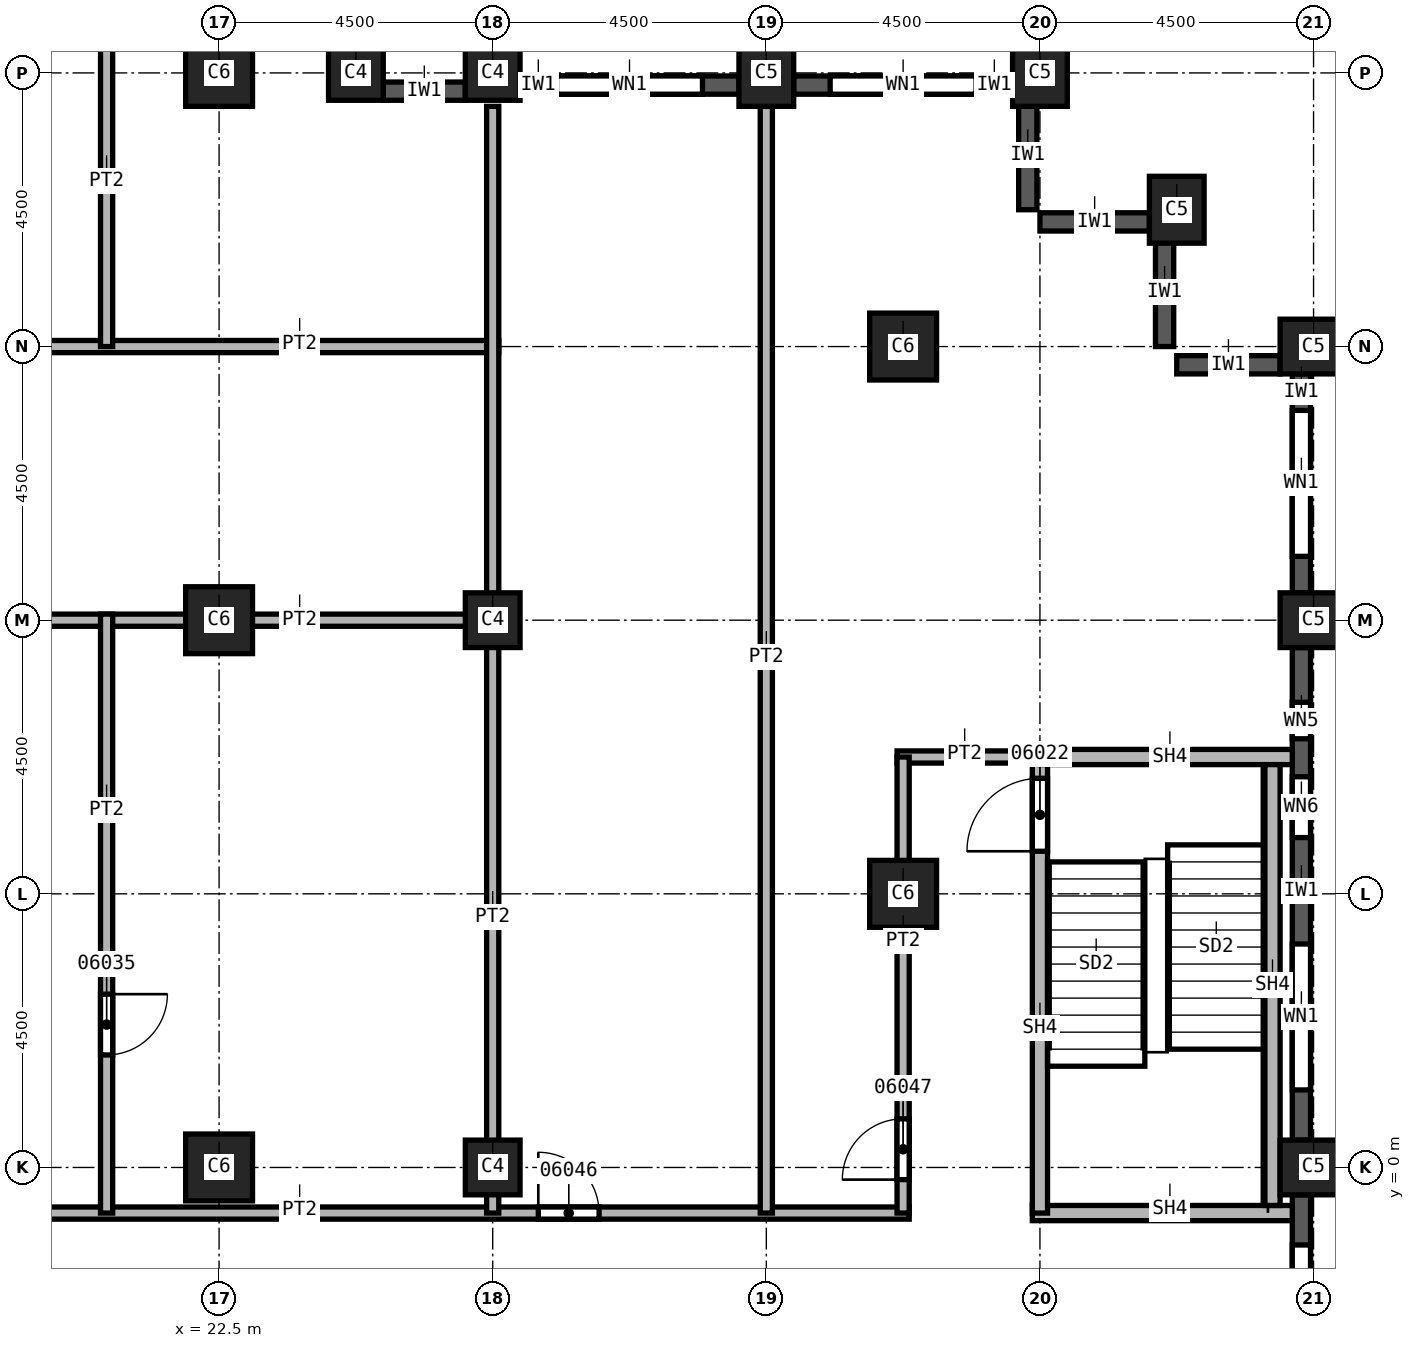
"""IFC4 building model, lengths in metres.
Left out: names, types, materials, properties, quantities, classifications, styles, units other than length and angle.
Written with IfcOpenShell. Run it as: python <this file> out.ifc"""

import sys

from ifc_helpers import new_model, si_unit, direction, frame, frame_2d, origin, origin_2d, place, context, subcontext, project, spatial, rectangle, extrude, element, fill, save


model = new_model("IFC4")
c1 = context("Model", 3, precision=1e-05, world=origin(), true_north=direction((0.0, 1.0)))
c2 = subcontext(c1, "Body", "Model", "MODEL_VIEW")
j1 = project(units=[si_unit("LENGTHUNIT", "METRE"), si_unit("PLANEANGLEUNIT", "RADIAN")], contexts=[c1])
p1 = place(None, origin())
s1 = spatial("IfcSite", under=j1, at=p1, CompositionType="ELEMENT")
p2 = place(p1, origin())
s2 = spatial("IfcBuilding", under=s1, at=p2, CompositionType="ELEMENT")
p3 = place(p2, frame((0.0, 0.0, 130.0)))
s3 = spatial("IfcBuildingStorey", under=s2, at=p3, CompositionType="ELEMENT", Elevation=130.0)
for number, where, z_axis, x_axis in (
    (1, (40.5, 0.0, 0.0), (0.0, 0.0, 1.0), (0.0, 1.0, 0.0)),
    (2, (40.5, 9.0, 0.0), (0.0, 0.0, 1.0), (0.0, 1.0, 0.0)),
    (3, (40.5, 13.5, 0.0), (0.0, 0.0, 1.0), (0.0, 1.0, 0.0)),
    (4, (38.25, 15.75, 0.0), (0.0, 0.0, 1.0), (1.0, 0.0, 0.0)),
    (5, (31.5, 18.0, 0.0), (0.0, 0.0, 1.0), (1.0, 0.0, 0.0)),
    (6, (36.0, 18.0, 0.0), (0.0, 0.0, 1.0), (1.0, 0.0, 0.0)),
):
    element("IfcColumn", number, at=place(p3, frame(where, z_axis=z_axis, x_axis=x_axis)), inside=s3, PredefinedType="COLUMN", context=c2, shape_type="SweptSolid", body=[
        extrude(rectangle(XDim=0.9, YDim=1.1, at=origin_2d()), origin(), (0.0, 0.0, 1.0), 3.7),
    ])
for number, where, z_axis, x_axis in (
    (7, (33.75, 4.5, 0.0), (0.0, 0.0, 1.0), (1.0, 0.0, 0.0)),
    (8, (33.75, 13.5, 0.0), (0.0, 0.0, 1.0), (1.0, 0.0, 0.0)),
    (9, (22.5, 0.0, 0.0), (0.0, 0.0, 1.0), (1.0, 0.0, 0.0)),
    (10, (22.5, 9.0, 0.0), (0.0, 0.0, 1.0), (1.0, 0.0, 0.0)),
    (11, (22.5, 18.0, 0.0), (0.0, 0.0, 1.0), (1.0, 0.0, 0.0)),
):
    element("IfcColumn", number, at=place(p3, frame(where, z_axis=z_axis, x_axis=x_axis)), inside=s3, PredefinedType="COLUMN", context=c2, shape_type="SweptSolid", body=[
        extrude(rectangle(XDim=1.1, YDim=1.1, at=origin_2d()), origin(), (0.0, 0.0, 1.0), 3.7),
    ])
for number, where, z_axis, x_axis in (
    (12, (27.0, 0.0, 0.0), (0.0, 0.0, 1.0), (1.0, 0.0, 0.0)),
    (13, (27.0, 9.0, 0.0), (0.0, 0.0, 1.0), (1.0, 0.0, 0.0)),
    (14, (27.0, 18.0, 0.0), (0.0, 0.0, 1.0), (1.0, 0.0, 0.0)),
    (15, (24.75, 18.0, 0.0), (0.0, 0.0, 1.0), (1.0, 0.0, 0.0)),
):
    element("IfcColumn", number, at=place(p3, frame(where, z_axis=z_axis, x_axis=x_axis)), inside=s3, PredefinedType="COLUMN", context=c2, shape_type="SweptSolid", body=[
        extrude(rectangle(XDim=0.9, YDim=0.9, at=origin_2d()), origin(), (0.0, 0.0, 1.0), 3.7),
    ])
p4 = place(p3, frame((39.95, 13.2, 0.0), z_axis=(0.0, 0.0, 1.0), x_axis=(-1.0, 0.0, 0.0)))
e16 = element("IfcWall", 16, at=p4, inside=s3, PredefinedType="SOLIDWALL", context=c2, shape_type="SweptSolid", body=[
    extrude(rectangle(XDim=1.7, YDim=0.3, at=frame_2d((0.85, 0.0))), origin(), (0.0, 0.0, 1.0), 3.1),
])
for number, where, z_axis, x_axis in (
    (17, (38.05, 15.3, 0.0), (0.0, 0.0, 1.0), (0.0, -1.0, 0.0)),
    (18, (37.8, 15.55, 0.0), (0.0, 0.0, 1.0), (-1.0, 0.0, 0.0)),
    (19, (35.8, 17.55, 0.0), (0.0, 0.0, 1.0), (0.0, -1.0, 0.0)),
):
    element("IfcWall", number, at=place(p3, frame(where, z_axis=z_axis, x_axis=x_axis)), inside=s3, PredefinedType="SOLIDWALL", context=c2, shape_type="SweptSolid", body=[
        extrude(rectangle(XDim=1.8, YDim=0.3, at=frame_2d((0.9, 0.0))), origin(), (0.0, 0.0, 1.0), 3.1),
    ])
p5 = place(p3, frame((40.3, -8.55, 0.0), z_axis=(0.0, 0.0, 1.0), x_axis=(0.0, 1.0, 0.0)))
e20 = element("IfcWall", 20, at=p5, inside=s3, PredefinedType="SOLIDWALL", context=c2, shape_type="SweptSolid", body=[
    extrude(rectangle(XDim=8.1, YDim=0.3, at=frame_2d((4.05, 0.0))), origin(), (0.0, 0.0, 1.0), 3.1),
])
p6 = place(p5, frame((0.825, 0.0, 0.8)))
e21 = element("IfcOpeningElement", 21, at=p6, cuts=e20, PredefinedType="OPENING", context=c2, shape_type="SweptSolid", body=[
    extrude(rectangle(XDim=2.4, YDim=1.95, at=frame_2d((1.2, 0.975))), frame((0.0, 0.15, 0.0), z_axis=(0.0, -1.0, 0.0), x_axis=(1.0, 0.0, 0.0)), (0.0, 0.0, 1.0), 0.3),
])
p7 = place(p5, frame((4.875, 0.0, 0.8)))
e22 = element("IfcOpeningElement", 22, at=p7, cuts=e20, PredefinedType="OPENING", context=c2, shape_type="SweptSolid", body=[
    extrude(rectangle(XDim=2.4, YDim=1.95, at=frame_2d((1.2, 0.975))), frame((0.0, 0.15, 0.0), z_axis=(0.0, -1.0, 0.0), x_axis=(1.0, 0.0, 0.0)), (0.0, 0.0, 1.0), 0.3),
])
p8 = place(p3, frame((40.3, 0.45, 0.0), z_axis=(0.0, 0.0, 1.0), x_axis=(0.0, 1.0, 0.0)))
e23 = element("IfcWall", 23, at=p8, inside=s3, PredefinedType="SOLIDWALL", context=c2, shape_type="SweptSolid", body=[
    extrude(rectangle(XDim=8.1, YDim=0.3, at=frame_2d((4.05, 0.0))), origin(), (0.0, 0.0, 1.0), 3.1),
])
p9 = place(p8, frame((0.825, 0.0, 0.8)))
e24 = element("IfcOpeningElement", 24, at=p9, cuts=e23, PredefinedType="OPENING", context=c2, shape_type="SweptSolid", body=[
    extrude(rectangle(XDim=2.4, YDim=1.95, at=frame_2d((1.2, 0.975))), frame((0.0, 0.15, 0.0), z_axis=(0.0, -1.0, 0.0), x_axis=(1.0, 0.0, 0.0)), (0.0, 0.0, 1.0), 0.3),
])
p10 = place(p8, frame((4.975, 0.0, 0.8)))
e25 = element("IfcOpeningElement", 25, at=p10, cuts=e23, PredefinedType="OPENING", context=c2, shape_type="SweptSolid", body=[
    extrude(rectangle(XDim=1.0, YDim=1.95, at=frame_2d((0.5, 0.975))), frame((0.0, 0.15, 0.0), z_axis=(0.0, -1.0, 0.0), x_axis=(1.0, 0.0, 0.0)), (0.0, 0.0, 1.0), 0.3),
])
p11 = place(p8, frame((6.6, 0.0, 0.8)))
e26 = element("IfcOpeningElement", 26, at=p11, cuts=e23, PredefinedType="OPENING", context=c2, shape_type="SweptSolid", body=[
    extrude(rectangle(XDim=0.6, YDim=1.95, at=frame_2d((0.3, 0.975))), frame((0.0, 0.15, 0.0), z_axis=(0.0, -1.0, 0.0), x_axis=(1.0, 0.0, 0.0)), (0.0, 0.0, 1.0), 0.3),
])
p12 = place(p3, frame((40.3, 9.45, 0.0), z_axis=(0.0, 0.0, 1.0), x_axis=(0.0, 1.0, 0.0)))
e27 = element("IfcWall", 27, at=p12, inside=s3, PredefinedType="SOLIDWALL", context=c2, shape_type="SweptSolid", body=[
    extrude(rectangle(XDim=3.6, YDim=0.3, at=frame_2d((1.8, 0.0))), origin(), (0.0, 0.0, 1.0), 3.1),
])
p13 = place(p12, frame((0.6, 0.0, 0.8)))
e28 = element("IfcOpeningElement", 28, at=p13, cuts=e27, PredefinedType="OPENING", context=c2, shape_type="SweptSolid", body=[
    extrude(rectangle(XDim=2.4, YDim=1.95, at=frame_2d((1.2, 0.975))), frame((0.0, 0.15, 0.0), z_axis=(0.0, -1.0, 0.0), x_axis=(1.0, 0.0, 0.0)), (0.0, 0.0, 1.0), 0.3),
])
p14 = place(p3, frame((35.55, 17.8, 0.0), z_axis=(0.0, 0.0, 1.0), x_axis=(-1.0, 0.0, 0.0)))
e29 = element("IfcWall", 29, at=p14, inside=s3, PredefinedType="SOLIDWALL", context=c2, shape_type="SweptSolid", body=[
    extrude(rectangle(XDim=3.6, YDim=0.3, at=frame_2d((1.8, 0.0))), origin(), (0.0, 0.0, 1.0), 3.1),
])
p15 = place(p14, frame((0.6, 0.0, 0.8)))
e30 = element("IfcOpeningElement", 30, at=p15, cuts=e29, PredefinedType="OPENING", context=c2, shape_type="SweptSolid", body=[
    extrude(rectangle(XDim=2.4, YDim=1.95, at=frame_2d((1.2, 0.975))), frame((0.0, 0.15, 0.0), z_axis=(0.0, -1.0, 0.0), x_axis=(1.0, 0.0, 0.0)), (0.0, 0.0, 1.0), 0.3),
])
p16 = place(p3, frame((31.05, 17.8, 0.0), z_axis=(0.0, 0.0, 1.0), x_axis=(-1.0, 0.0, 0.0)))
e31 = element("IfcWall", 31, at=p16, inside=s3, PredefinedType="SOLIDWALL", context=c2, shape_type="SweptSolid", body=[
    extrude(rectangle(XDim=3.6, YDim=0.3, at=frame_2d((1.8, 0.0))), origin(), (0.0, 0.0, 1.0), 3.1),
])
p17 = place(p16, frame((0.6, 0.0, 0.8)))
e32 = element("IfcOpeningElement", 32, at=p17, cuts=e31, PredefinedType="OPENING", context=c2, shape_type="SweptSolid", body=[
    extrude(rectangle(XDim=2.4, YDim=1.95, at=frame_2d((1.2, 0.975))), frame((0.0, 0.15, 0.0), z_axis=(0.0, -1.0, 0.0), x_axis=(1.0, 0.0, 0.0)), (0.0, 0.0, 1.0), 0.3),
])
p18 = place(p3, frame((26.55, 17.7, 0.0), z_axis=(0.0, 0.0, 1.0), x_axis=(-1.0, 0.0, 0.0)))
e33 = element("IfcWall", 33, at=p18, inside=s3, PredefinedType="SOLIDWALL", context=c2, shape_type="SweptSolid", body=[
    extrude(rectangle(XDim=1.35, YDim=0.3, at=frame_2d((0.675, 0.0))), origin(), (0.0, 0.0, 1.0), 3.1),
])
p19 = place(p3, frame((15.4, -0.75, 0.0), z_axis=(0.0, 0.0, 1.0), x_axis=(1.0, 0.0, 0.0)))
e34 = element("IfcWall", 34, at=p19, inside=s3, PredefinedType="PARTITIONING", context=c2, shape_type="SweptSolid", body=[
    extrude(rectangle(XDim=18.45, YDim=0.2, at=frame_2d((9.225, 0.0))), origin(), (0.0, 0.0, 1.0), 3.7),
])
p20 = place(p19, frame((12.35, 0.0, 0.0)))
e35 = element("IfcOpeningElement", 35, at=p20, cuts=e34, PredefinedType="OPENING", context=c2, shape_type="SweptSolid", body=[
    extrude(rectangle(XDim=1.0, YDim=2.1, at=frame_2d((0.5, 1.05))), frame((0.0, 0.1, 0.0), z_axis=(0.0, -1.0, 0.0), x_axis=(1.0, 0.0, 0.0)), (0.0, 0.0, 1.0), 0.2),
])
for number, where, z_axis, x_axis in (
    (36, (15.4, 9.0, 0.0), (0.0, 0.0, 1.0), (1.0, 0.0, 0.0)),
    (37, (15.4, 13.5, 0.0), (0.0, 0.0, 1.0), (1.0, 0.0, 0.0)),
):
    element("IfcWall", number, at=place(p3, frame(where, z_axis=z_axis, x_axis=x_axis)), inside=s3, PredefinedType="PARTITIONING", context=c2, shape_type="SweptSolid", body=[
        extrude(rectangle(XDim=11.7, YDim=0.2, at=frame_2d((5.85, 0.0))), origin(), (0.0, 0.0, 1.0), 3.7),
    ])
p21 = place(p3, frame((20.65, 9.1, 0.0), z_axis=(0.0, 0.0, 1.0), x_axis=(0.0, -1.0, 0.0)))
e38 = element("IfcWall", 38, at=p21, inside=s3, PredefinedType="PARTITIONING", context=c2, shape_type="SweptSolid", body=[
    extrude(rectangle(XDim=9.85, YDim=0.2, at=frame_2d((4.925, 0.0))), origin(), (0.0, 0.0, 1.0), 3.7),
])
p22 = place(p21, frame((6.25, 0.0, 0.0)))
e39 = element("IfcOpeningElement", 39, at=p22, cuts=e38, PredefinedType="OPENING", context=c2, shape_type="SweptSolid", body=[
    extrude(rectangle(XDim=1.0, YDim=2.1, at=frame_2d((0.5, 1.05))), frame((0.0, 0.1, 0.0), z_axis=(0.0, -1.0, 0.0), x_axis=(1.0, 0.0, 0.0)), (0.0, 0.0, 1.0), 0.2),
])
p23 = place(p3, frame((20.65, 23.25, 0.0), z_axis=(0.0, 0.0, 1.0), x_axis=(0.0, -1.0, 0.0)))
e40 = element("IfcWall", 40, at=p23, inside=s3, PredefinedType="PARTITIONING", context=c2, shape_type="SweptSolid", body=[
    extrude(rectangle(XDim=9.75, YDim=0.2, at=frame_2d((4.875, 0.0))), origin(), (0.0, 0.0, 1.0), 3.7),
])
p24 = place(p23, frame((3.4, 0.0, 0.0)))
e41 = element("IfcOpeningElement", 41, at=p24, cuts=e40, PredefinedType="OPENING", context=c2, shape_type="SweptSolid", body=[
    extrude(rectangle(XDim=1.0, YDim=2.1, at=frame_2d((0.5, 1.05))), frame((0.0, 0.1, 0.0), z_axis=(0.0, -1.0, 0.0), x_axis=(1.0, 0.0, 0.0)), (0.0, 0.0, 1.0), 0.2),
])
for number, where, z_axis, x_axis in (
    (42, (27.0, 17.45, 0.0), (0.0, 0.0, 1.0), (0.0, -1.0, 0.0)),
    (43, (31.5, 17.45, 0.0), (0.0, 0.0, 1.0), (0.0, -1.0, 0.0)),
):
    element("IfcWall", number, at=place(p3, frame(where, z_axis=z_axis, x_axis=x_axis)), inside=s3, PredefinedType="PARTITIONING", context=c2, shape_type="SweptSolid", body=[
        extrude(rectangle(XDim=18.2, YDim=0.2, at=frame_2d((9.1, 0.0))), origin(), (0.0, 0.0, 1.0), 3.7),
    ])
p25 = place(p3, frame((33.65, 6.75, 0.0), z_axis=(0.0, 0.0, 1.0), x_axis=(1.0, 0.0, 0.0)))
e44 = element("IfcWall", 44, at=p25, inside=s3, PredefinedType="PARTITIONING", context=c2, shape_type="SweptSolid", body=[
    extrude(rectangle(XDim=2.35, YDim=0.2, at=frame_2d((1.175, 0.0))), origin(), (0.0, 0.0, 1.0), 3.7),
])
p26 = place(p3, frame((33.75, -0.75, 0.0), z_axis=(0.0, 0.0, 1.0), x_axis=(0.0, 1.0, 0.0)))
e45 = element("IfcWall", 45, at=p26, inside=s3, PredefinedType="PARTITIONING", context=c2, shape_type="SweptSolid", body=[
    extrude(rectangle(XDim=7.5, YDim=0.2, at=frame_2d((3.75, 0.0))), origin(), (0.0, 0.0, 1.0), 3.7),
])
p27 = place(p26, frame((0.55, 0.0, 0.0)))
e46 = element("IfcOpeningElement", 46, at=p27, cuts=e45, PredefinedType="OPENING", context=c2, shape_type="SweptSolid", body=[
    extrude(rectangle(XDim=1.0, YDim=2.1, at=frame_2d((0.5, 1.05))), frame((0.0, 0.1, 0.0), z_axis=(0.0, -1.0, 0.0), x_axis=(1.0, 0.0, 0.0)), (0.0, 0.0, 1.0), 0.2),
])
p28 = place(p3, frame((35.875, -0.75, 0.0), z_axis=(0.0, 0.0, 1.0), x_axis=(1.0, 0.0, 0.0)))
e47 = element("IfcWall", 47, at=p28, inside=s3, PredefinedType="SOLIDWALL", context=c2, shape_type="SweptSolid", body=[
    extrude(rectangle(XDim=4.275, YDim=0.25, at=frame_2d((2.137, 0.0))), origin(), (0.0, 0.0, 1.0), 3.7),
])
p29 = place(p3, frame((36.0, -0.75, 0.0), z_axis=(0.0, 0.0, 1.0), x_axis=(0.0, 1.0, 0.0)))
e48 = element("IfcWall", 48, at=p29, inside=s3, PredefinedType="SOLIDWALL", context=c2, shape_type="SweptSolid", body=[
    extrude(rectangle(XDim=7.625, YDim=0.25, at=frame_2d((3.812, 0.0))), origin(), (0.0, 0.0, 1.0), 3.7),
])
p30 = place(p29, frame((5.95, 0.0, 0.0)))
e49 = element("IfcOpeningElement", 49, at=p30, cuts=e48, PredefinedType="OPENING", context=c2, shape_type="SweptSolid", body=[
    extrude(rectangle(XDim=1.2, YDim=2.1, at=frame_2d((0.6, 1.05))), frame((0.0, 0.125, 0.0), z_axis=(0.0, -1.0, 0.0), x_axis=(1.0, 0.0, 0.0)), (0.0, 0.0, 1.0), 0.25),
])
p31 = place(p3, frame((36.0, 6.75, 0.0), z_axis=(0.0, 0.0, 1.0), x_axis=(1.0, 0.0, 0.0)))
e50 = element("IfcWall", 50, at=p31, inside=s3, PredefinedType="SOLIDWALL", context=c2, shape_type="SweptSolid", body=[
    extrude(rectangle(XDim=4.15, YDim=0.25, at=frame_2d((2.075, 0.0))), origin(), (0.0, 0.0, 1.0), 3.7),
])
p32 = place(p3, frame((39.825, -0.625, 0.0), z_axis=(0.0, 0.0, 1.0), x_axis=(0.0, 1.0, 0.0)))
e51 = element("IfcWall", 51, at=p32, inside=s3, PredefinedType="SOLIDWALL", context=c2, shape_type="SweptSolid", body=[
    extrude(rectangle(XDim=7.25, YDim=0.25, at=frame_2d((3.625, 0.0))), origin(), (0.0, 0.0, 1.0), 3.7),
])
p33 = place(p7, origin())
e52 = element("IfcWindow", 52, at=p33, inside=s3, PartitioningType="SINGLE_PANEL", PredefinedType="WINDOW", context=c2, shape_type="SweptSolid", body=[
    extrude(rectangle(XDim=2.4, YDim=1.95, at=frame_2d((1.2, 0.975))), frame((0.0, 0.03, 0.0), z_axis=(0.0, -1.0, 0.0), x_axis=(1.0, 0.0, 0.0)), (0.0, 0.0, 1.0), 0.06),
])
fill(e22, e52)
p34 = place(p9, origin())
e53 = element("IfcWindow", 53, at=p34, inside=s3, PartitioningType="SINGLE_PANEL", PredefinedType="WINDOW", context=c2, shape_type="SweptSolid", body=[
    extrude(rectangle(XDim=2.4, YDim=1.95, at=frame_2d((1.2, 0.975))), frame((0.0, 0.03, 0.0), z_axis=(0.0, -1.0, 0.0), x_axis=(1.0, 0.0, 0.0)), (0.0, 0.0, 1.0), 0.06),
])
fill(e24, e53)
p35 = place(p13, origin())
e54 = element("IfcWindow", 54, at=p35, inside=s3, PartitioningType="SINGLE_PANEL", PredefinedType="WINDOW", context=c2, shape_type="SweptSolid", body=[
    extrude(rectangle(XDim=2.4, YDim=1.95, at=frame_2d((1.2, 0.975))), frame((0.0, 0.03, 0.0), z_axis=(0.0, -1.0, 0.0), x_axis=(1.0, 0.0, 0.0)), (0.0, 0.0, 1.0), 0.06),
])
fill(e28, e54)
p36 = place(p15, origin())
e55 = element("IfcWindow", 55, at=p36, inside=s3, PartitioningType="SINGLE_PANEL", PredefinedType="WINDOW", context=c2, shape_type="SweptSolid", body=[
    extrude(rectangle(XDim=2.4, YDim=1.95, at=frame_2d((1.2, 0.975))), frame((0.0, 0.03, 0.0), z_axis=(0.0, -1.0, 0.0), x_axis=(1.0, 0.0, 0.0)), (0.0, 0.0, 1.0), 0.06),
])
fill(e30, e55)
p37 = place(p17, origin())
e56 = element("IfcWindow", 56, at=p37, inside=s3, PartitioningType="SINGLE_PANEL", PredefinedType="WINDOW", context=c2, shape_type="SweptSolid", body=[
    extrude(rectangle(XDim=2.4, YDim=1.95, at=frame_2d((1.2, 0.975))), frame((0.0, 0.03, 0.0), z_axis=(0.0, -1.0, 0.0), x_axis=(1.0, 0.0, 0.0)), (0.0, 0.0, 1.0), 0.06),
])
fill(e32, e56)
p38 = place(p30, origin())
e57 = element("IfcDoor", 57, at=p38, inside=s3, OperationType="SINGLE_SWING_LEFT", PredefinedType="DOOR", context=c2, shape_type="SweptSolid", body=[
    extrude(rectangle(XDim=1.2, YDim=2.1, at=frame_2d((0.6, 1.05))), frame((0.0, 0.025, 0.0), z_axis=(0.0, -1.0, 0.0), x_axis=(1.0, 0.0, 0.0)), (0.0, 0.0, 1.0), 0.05),
])
fill(e49, e57)
p39 = place(p22, origin())
e58 = element("IfcDoor", 58, at=p39, inside=s3, OperationType="SINGLE_SWING_RIGHT", PredefinedType="DOOR", context=c2, shape_type="SweptSolid", body=[
    extrude(rectangle(XDim=1.0, YDim=2.1, at=frame_2d((0.5, 1.05))), frame((0.0, 0.025, 0.0), z_axis=(0.0, -1.0, 0.0), x_axis=(1.0, 0.0, 0.0)), (0.0, 0.0, 1.0), 0.05),
])
fill(e39, e58)
p40 = place(p20, origin())
e59 = element("IfcDoor", 59, at=p40, inside=s3, OperationType="SINGLE_SWING_LEFT", PredefinedType="DOOR", context=c2, shape_type="SweptSolid", body=[
    extrude(rectangle(XDim=1.0, YDim=2.1, at=frame_2d((0.5, 1.05))), frame((0.0, 0.025, 0.0), z_axis=(0.0, -1.0, 0.0), x_axis=(1.0, 0.0, 0.0)), (0.0, 0.0, 1.0), 0.05),
])
fill(e35, e59)
p41 = place(p27, origin())
e60 = element("IfcDoor", 60, at=p41, inside=s3, OperationType="SINGLE_SWING_RIGHT", PredefinedType="DOOR", context=c2, shape_type="SweptSolid", body=[
    extrude(rectangle(XDim=1.0, YDim=2.1, at=frame_2d((0.5, 1.05))), frame((0.0, 0.025, 0.0), z_axis=(0.0, -1.0, 0.0), x_axis=(1.0, 0.0, 0.0)), (0.0, 0.0, 1.0), 0.05),
])
fill(e46, e60)
p42 = place(p10, origin())
e61 = element("IfcWindow", 61, at=p42, inside=s3, PartitioningType="SINGLE_PANEL", PredefinedType="WINDOW", context=c2, shape_type="SweptSolid", body=[
    extrude(rectangle(XDim=1.0, YDim=1.95, at=frame_2d((0.5, 0.975))), frame((0.0, 0.03, 0.0), z_axis=(0.0, -1.0, 0.0), x_axis=(1.0, 0.0, 0.0)), (0.0, 0.0, 1.0), 0.06),
])
fill(e25, e61)
p43 = place(p11, origin())
e62 = element("IfcWindow", 62, at=p43, inside=s3, PartitioningType="SINGLE_PANEL", PredefinedType="WINDOW", context=c2, shape_type="SweptSolid", body=[
    extrude(rectangle(XDim=0.6, YDim=1.95, at=frame_2d((0.3, 0.975))), frame((0.0, 0.03, 0.0), z_axis=(0.0, -1.0, 0.0), x_axis=(1.0, 0.0, 0.0)), (0.0, 0.0, 1.0), 0.06),
])
fill(e26, e62)
save(model, sys.argv[1])
